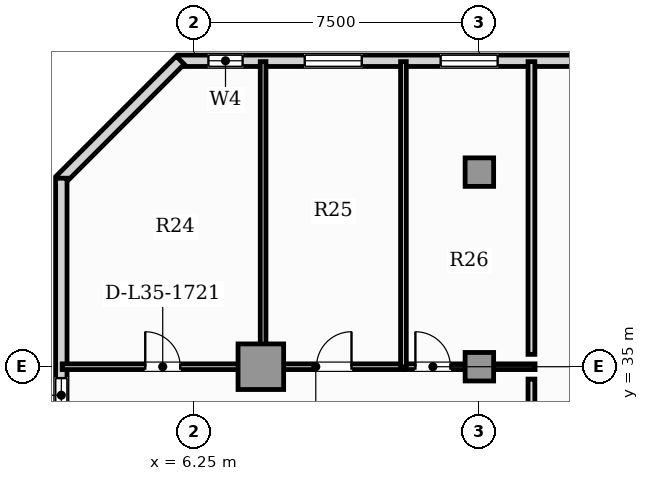
"""IFC4 building model, lengths in metres.
Left out: names, types, materials, properties, quantities, classifications, styles, units other than length and angle.
Written with IfcOpenShell. Run it as: python <this file> out.ifc"""

import sys

from ifc_helpers import new_model, si_unit, direction, frame, frame_2d, origin, origin_2d, place, context, subcontext, project, spatial, rectangle, hollow_rectangle, extrude, element, fill, save


model = new_model("IFC4")
c1 = context("Model", 3, precision=1e-05, world=origin(), true_north=direction((0.0, 1.0)))
c2 = subcontext(c1, "Body", "Model", "MODEL_VIEW")
j1 = project(units=[si_unit("LENGTHUNIT", "METRE"), si_unit("PLANEANGLEUNIT", "RADIAN")], contexts=[c1])
p1 = place(None, origin())
s1 = spatial("IfcSite", under=j1, at=p1, CompositionType="ELEMENT")
p2 = place(p1, origin())
s2 = spatial("IfcBuilding", under=s1, at=p2, CompositionType="ELEMENT")
p3 = place(p2, frame((0.0, 0.0, 145.2)))
s3 = spatial("IfcBuildingStorey", under=s2, at=p3, CompositionType="ELEMENT", Elevation=145.2)
p4 = place(p3, frame((8.0, 35.0, 0.0), z_axis=(0.0, 0.0, 1.0), x_axis=(1.0, 0.0, 0.0)))
e1 = element("IfcColumn", 1, at=p4, inside=s3, PredefinedType="USERDEFINED", context=c2, shape_type="SweptSolid", body=[
    extrude(hollow_rectangle(XDim=1.2, YDim=1.2, WallThickness=0.07, at=origin_2d()), origin(), (0.0, 0.0, 1.0), 3.85),
])
for number, where, z_axis, x_axis in (
    (2, (13.75, 40.12, 0.0), (0.0, 0.0, 1.0), (1.0, 0.0, 0.0)),
    (3, (13.75, 35.0, 0.0), (0.0, 0.0, 1.0), (1.0, 0.0, 0.0)),
):
    element("IfcColumn", number, at=place(p3, frame(where, z_axis=z_axis, x_axis=x_axis)), inside=s3, PredefinedType="COLUMN", context=c2, shape_type="SweptSolid", body=[
        extrude(rectangle(XDim=0.75, YDim=0.75, at=origin_2d()), origin(), (0.0, 0.0, 1.0), 3.85),
    ])
p5 = place(p3, frame((21.71, 43.05, 0.0), z_axis=(0.0, 0.0, 1.0), x_axis=(-1.0, 0.0, 0.0)))
e4 = element("IfcWall", 4, at=p5, inside=s3, PredefinedType="SOLIDWALL", context=c2, shape_type="SweptSolid", body=[
    extrude(rectangle(XDim=15.87, YDim=0.3, at=frame_2d((7.935, 0.0))), origin(), (0.0, 0.0, 1.0), 3.63),
])
p6 = place(p5, frame((14.19, 0.0, 0.95)))
e5 = element("IfcOpeningElement", 5, at=p6, cuts=e4, PredefinedType="OPENING", context=c2, shape_type="SweptSolid", body=[
    extrude(rectangle(XDim=0.9, YDim=1.5, at=frame_2d((0.45, 0.75))), frame((0.0, 0.16, 0.0), z_axis=(0.0, -1.0, 0.0), x_axis=(1.0, 0.0, 0.0)), (0.0, 0.0, 1.0), 0.32),
])
p7 = place(p5, frame((11.055, 0.0, 0.9)))
e6 = element("IfcOpeningElement", 6, at=p7, cuts=e4, PredefinedType="OPENING", context=c2, shape_type="SweptSolid", body=[
    extrude(rectangle(XDim=1.5, YDim=1.95, at=frame_2d((0.75, 0.975))), frame((0.0, 0.16, 0.0), z_axis=(0.0, -1.0, 0.0), x_axis=(1.0, 0.0, 0.0)), (0.0, 0.0, 1.0), 0.32),
])
p8 = place(p5, frame((7.479, 0.0, 0.9)))
e7 = element("IfcOpeningElement", 7, at=p8, cuts=e4, PredefinedType="OPENING", context=c2, shape_type="SweptSolid", body=[
    extrude(rectangle(XDim=1.5, YDim=1.95, at=frame_2d((0.75, 0.975))), frame((0.0, 0.16, 0.0), z_axis=(0.0, -1.0, 0.0), x_axis=(1.0, 0.0, 0.0)), (0.0, 0.0, 1.0), 0.32),
])
p9 = place(p3, frame((5.878, 43.066, 0.0), z_axis=(0.0, 0.0, 1.0), x_axis=(-0.707079321262, -0.707134240044, 0.0)))
e8 = element("IfcWall", 8, at=p9, inside=s3, PredefinedType="SOLIDWALL", context=c2, shape_type="SweptSolid", body=[
    extrude(rectangle(XDim=4.446, YDim=0.3, at=frame_2d((2.223, 0.0))), origin(), (0.0, 0.0, 1.0), 3.63),
])
p10 = place(p3, frame((2.75, 39.96, 0.0), z_axis=(0.0, 0.0, 1.0), x_axis=(0.0, -1.0, 0.0)))
e9 = element("IfcWall", 9, at=p10, inside=s3, PredefinedType="SOLIDWALL", context=c2, shape_type="SweptSolid", body=[
    extrude(rectangle(XDim=36.72, YDim=0.3, at=frame_2d((18.36, 0.0))), origin(), (0.0, 0.0, 1.0), 3.63),
])
p11 = place(p10, frame((5.26, 0.0, 0.95)))
e10 = element("IfcOpeningElement", 10, at=p11, cuts=e9, PredefinedType="OPENING", context=c2, shape_type="SweptSolid", body=[
    extrude(rectangle(XDim=0.9, YDim=1.5, at=frame_2d((0.45, 0.75))), frame((0.0, 0.16, 0.0), z_axis=(0.0, -1.0, 0.0), x_axis=(1.0, 0.0, 0.0)), (0.0, 0.0, 1.0), 0.32),
])
p12 = place(p10, frame((13.314, 0.0, 0.9)))
e11 = element("IfcOpeningElement", 11, at=p12, cuts=e9, PredefinedType="OPENING", context=c2, shape_type="SweptSolid", body=[
    extrude(rectangle(XDim=1.5, YDim=1.95, at=frame_2d((0.75, 0.975))), frame((0.0, 0.16, 0.0), z_axis=(0.0, -1.0, 0.0), x_axis=(1.0, 0.0, 0.0)), (0.0, 0.0, 1.0), 0.32),
])
p13 = place(p3, frame((2.772, 35.0, 0.0), z_axis=(0.0, 0.0, 1.0), x_axis=(1.0, 0.0, 0.0)))
e12 = element("IfcWall", 12, at=p13, inside=s3, PredefinedType="PARTITIONING", context=c2, shape_type="SweptSolid", body=[
    extrude(rectangle(XDim=5.292, YDim=0.15, at=frame_2d((2.646, 0.0))), origin(), (0.0, 0.0, 1.0), 3.63),
])
p14 = place(p13, frame((2.186, 0.0, 0.0)))
e13 = element("IfcOpeningElement", 13, at=p14, cuts=e12, PredefinedType="OPENING", context=c2, shape_type="SweptSolid", body=[
    extrude(rectangle(XDim=0.92, YDim=2.1, at=frame_2d((0.46, 1.05))), frame((0.0, 0.085, 0.0), z_axis=(0.0, -1.0, 0.0), x_axis=(1.0, 0.0, 0.0)), (0.0, 0.0, 1.0), 0.17),
])
p15 = place(p3, frame((8.094, 35.0, 0.0), z_axis=(0.0, 0.0, 1.0), x_axis=(1.0, 0.0, 0.0)))
e14 = element("IfcWall", 14, at=p15, inside=s3, PredefinedType="PARTITIONING", context=c2, shape_type="SweptSolid", body=[
    extrude(rectangle(XDim=3.662, YDim=0.15, at=frame_2d((1.831, 0.0))), origin(), (0.0, 0.0, 1.0), 3.013),
])
p16 = place(p15, frame((1.371, 0.0, 0.0)))
e15 = element("IfcOpeningElement", 15, at=p16, cuts=e14, PredefinedType="OPENING", context=c2, shape_type="SweptSolid", body=[
    extrude(rectangle(XDim=0.92, YDim=2.1, at=frame_2d((0.46, 1.05))), frame((0.0, 0.085, 0.0), z_axis=(0.0, -1.0, 0.0), x_axis=(1.0, 0.0, 0.0)), (0.0, 0.0, 1.0), 0.17),
])
p17 = place(p3, frame((11.787, 35.0, 0.0), z_axis=(0.0, 0.0, 1.0), x_axis=(1.0, 0.0, 0.0)))
e16 = element("IfcWall", 16, at=p17, inside=s3, PredefinedType="PARTITIONING", context=c2, shape_type="SweptSolid", body=[
    extrude(rectangle(XDim=3.428, YDim=0.15, at=frame_2d((1.714, 0.0))), origin(), (0.0, 0.0, 1.0), 3.013),
])
p18 = place(p17, frame((0.28, 0.0, 0.0)))
e17 = element("IfcOpeningElement", 17, at=p18, cuts=e16, PredefinedType="OPENING", context=c2, shape_type="SweptSolid", body=[
    extrude(rectangle(XDim=0.92, YDim=2.1, at=frame_2d((0.46, 1.05))), frame((0.0, 0.085, 0.0), z_axis=(0.0, -1.0, 0.0), x_axis=(1.0, 0.0, 0.0)), (0.0, 0.0, 1.0), 0.17),
])
for number, where, z_axis, x_axis in (
    (18, (8.059, 34.995, 0.0), (0.0, 0.0, 1.0), (0.0, 1.0, 0.0)),
    (19, (11.752, 34.995, 0.0), (0.0, 0.0, 1.0), (0.0, 1.0, 0.0)),
):
    element("IfcWall", number, at=place(p3, frame(where, z_axis=z_axis, x_axis=x_axis)), inside=s3, PredefinedType="PARTITIONING", context=c2, shape_type="SweptSolid", body=[
        extrude(rectangle(XDim=8.032, YDim=0.15, at=frame_2d((4.016, 0.0))), origin(), (0.0, 0.0, 1.0), 3.63),
    ])
p19 = place(p3, frame((15.12, 34.675, 0.0), z_axis=(0.0, 0.0, 1.0), x_axis=(0.0, -1.0, 0.0)))
e20 = element("IfcWall", 20, at=p19, inside=s3, PredefinedType="PARTITIONING", context=c2, shape_type="SweptSolid", body=[
    extrude(rectangle(XDim=0.85, YDim=0.18, at=frame_2d((0.425, 0.0))), origin(), (0.0, 0.0, 1.0), 3.63),
])
p20 = place(p3, frame((15.12, 43.028, 0.0), z_axis=(0.0, 0.0, 1.0), x_axis=(0.0, -1.0, 0.0)))
e21 = element("IfcWall", 21, at=p20, inside=s3, PredefinedType="PARTITIONING", context=c2, shape_type="SweptSolid", body=[
    extrude(rectangle(XDim=7.703, YDim=0.18, at=frame_2d((3.851, 0.0))), origin(), (0.0, 0.0, 1.0), 3.63),
])
p21 = place(p11, origin())
e22 = element("IfcWindow", 22, at=p21, inside=s3, PartitioningType="SINGLE_PANEL", PredefinedType="WINDOW", context=c2, shape_type="SweptSolid", body=[
    extrude(rectangle(XDim=0.9, YDim=1.5, at=frame_2d((0.45, 0.75))), frame((0.0, 0.03, 0.0), z_axis=(0.0, -1.0, 0.0), x_axis=(1.0, 0.0, 0.0)), (0.0, 0.0, 1.0), 0.06),
])
fill(e10, e22)
p22 = place(p6, origin())
e23 = element("IfcWindow", 23, at=p22, inside=s3, PartitioningType="SINGLE_PANEL", PredefinedType="WINDOW", context=c2, shape_type="SweptSolid", body=[
    extrude(rectangle(XDim=0.9, YDim=1.5, at=frame_2d((0.45, 0.75))), frame((0.0, 0.03, 0.0), z_axis=(0.0, -1.0, 0.0), x_axis=(1.0, 0.0, 0.0)), (0.0, 0.0, 1.0), 0.06),
])
fill(e5, e23)
p23 = place(p7, origin())
e24 = element("IfcWindow", 24, at=p23, inside=s3, PartitioningType="SINGLE_PANEL", PredefinedType="WINDOW", context=c2, shape_type="SweptSolid", body=[
    extrude(rectangle(XDim=1.5, YDim=1.95, at=frame_2d((0.75, 0.975))), frame((0.0, 0.03, 0.0), z_axis=(0.0, -1.0, 0.0), x_axis=(1.0, 0.0, 0.0)), (0.0, 0.0, 1.0), 0.06),
])
fill(e6, e24)
p24 = place(p8, origin())
e25 = element("IfcWindow", 25, at=p24, inside=s3, PartitioningType="SINGLE_PANEL", PredefinedType="WINDOW", context=c2, shape_type="SweptSolid", body=[
    extrude(rectangle(XDim=1.5, YDim=1.95, at=frame_2d((0.75, 0.975))), frame((0.0, 0.03, 0.0), z_axis=(0.0, -1.0, 0.0), x_axis=(1.0, 0.0, 0.0)), (0.0, 0.0, 1.0), 0.06),
])
fill(e7, e25)
p25 = place(p14, origin())
e26 = element("IfcDoor", 26, at=p25, inside=s3, OperationType="SINGLE_SWING_LEFT", PredefinedType="DOOR", context=c2, shape_type="SweptSolid", body=[
    extrude(rectangle(XDim=0.92, YDim=2.1, at=frame_2d((0.46, 1.05))), frame((0.0, 0.025, 0.0), z_axis=(0.0, -1.0, 0.0), x_axis=(1.0, 0.0, 0.0)), (0.0, 0.0, 1.0), 0.05),
])
fill(e13, e26)
p26 = place(p16, origin())
e27 = element("IfcDoor", 27, at=p26, inside=s3, OperationType="SINGLE_SWING_RIGHT", PredefinedType="DOOR", context=c2, shape_type="SweptSolid", body=[
    extrude(rectangle(XDim=0.92, YDim=2.1, at=frame_2d((0.46, 1.05))), frame((0.0, 0.025, 0.0), z_axis=(0.0, -1.0, 0.0), x_axis=(1.0, 0.0, 0.0)), (0.0, 0.0, 1.0), 0.05),
])
fill(e15, e27)
p27 = place(p18, origin())
e28 = element("IfcDoor", 28, at=p27, inside=s3, OperationType="SINGLE_SWING_LEFT", PredefinedType="DOOR", context=c2, shape_type="SweptSolid", body=[
    extrude(rectangle(XDim=0.92, YDim=2.1, at=frame_2d((0.46, 1.05))), frame((0.0, 0.025, 0.0), z_axis=(0.0, -1.0, 0.0), x_axis=(1.0, 0.0, 0.0)), (0.0, 0.0, 1.0), 0.05),
])
fill(e17, e28)
save(model, sys.argv[1])
